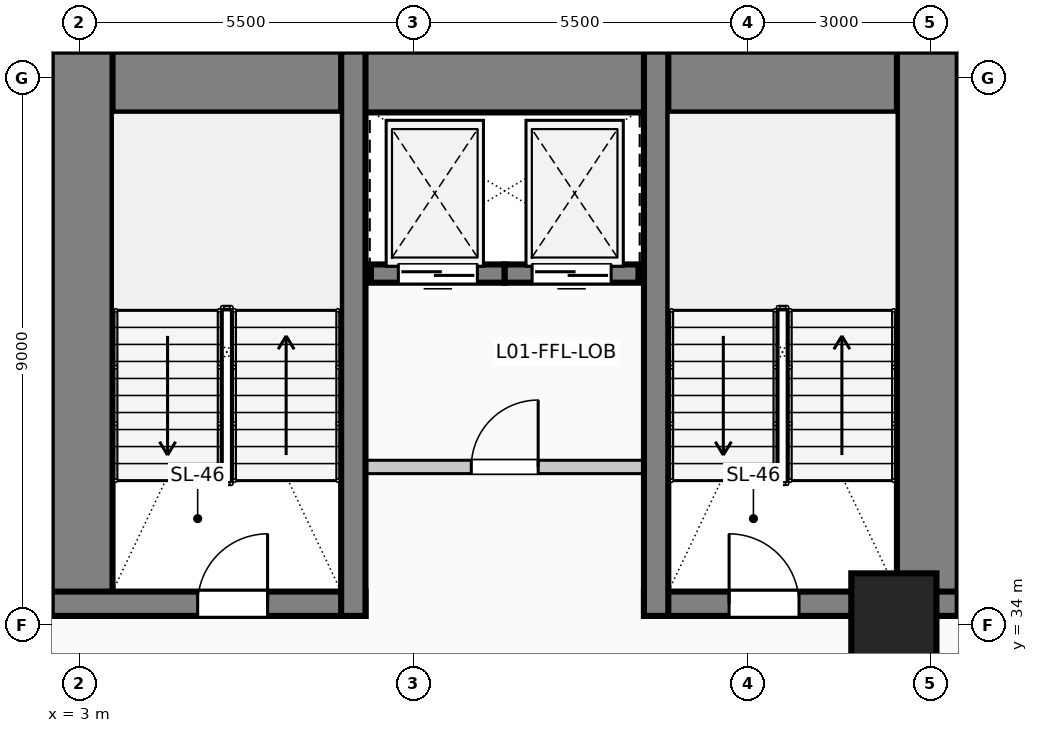
"""IFC4 building model, lengths in metres.
Left out: names, types, materials, properties, quantities, classifications, styles, units other than length and angle.
Written with IfcOpenShell. Run it as: python <this file> out.ifc"""

import sys

from ifc_helpers import new_model, si_unit, direction, frame, frame_2d, origin, origin_2d, place, context, subcontext, project, spatial, rectangle, extrude, element, fill, save


model = new_model("IFC4")
c1 = context("Model", 3, precision=1e-05, world=origin(), true_north=direction((0.0, 1.0)))
c2 = subcontext(c1, "Body", "Model", "MODEL_VIEW")
j1 = project(units=[si_unit("LENGTHUNIT", "METRE"), si_unit("PLANEANGLEUNIT", "RADIAN")], contexts=[c1])
p1 = place(None, origin())
s1 = spatial("IfcSite", under=j1, at=p1, CompositionType="ELEMENT")
p2 = place(p1, origin())
s2 = spatial("IfcBuilding", under=s1, at=p2, CompositionType="ELEMENT")
p3 = place(p2, frame((0.0, 0.0, 5.4)))
s3 = spatial("IfcBuildingStorey", under=s2, at=p3, CompositionType="ELEMENT", Elevation=5.4)
p4 = place(p3, frame((2.55, 42.93, 0.0), z_axis=(0.0, 0.0, 1.0), x_axis=(1.0, 0.0, 0.0)))
e1 = element("IfcWall", 1, at=p4, inside=s3, PredefinedType="SHEAR", context=c2, shape_type="SweptSolid", body=[
    extrude(rectangle(XDim=14.9, YDim=1.0, at=frame_2d((7.45, 0.0))), origin(), (0.0, 0.0, 1.0), 4.05),
])
for number, where, z_axis, x_axis in (
    (2, (3.05, 34.15, 0.0), (0.0, 0.0, 1.0), (0.0, 1.0, 0.0)),
    (3, (16.95, 34.15, 0.0), (0.0, 0.0, 1.0), (0.0, 1.0, 0.0)),
):
    element("IfcWall", number, at=place(p3, frame(where, z_axis=z_axis, x_axis=x_axis)), inside=s3, PredefinedType="SHEAR", context=c2, shape_type="SweptSolid", body=[
        extrude(rectangle(XDim=9.28, YDim=1.0, at=frame_2d((4.64, 0.0))), origin(), (0.0, 0.0, 1.0), 4.05),
    ])
p5 = place(p3, frame((2.55, 34.35, 0.0), z_axis=(0.0, 0.0, 1.0), x_axis=(1.0, 0.0, 0.0)))
e4 = element("IfcWall", 4, at=p5, inside=s3, PredefinedType="SHEAR", context=c2, shape_type="SweptSolid", body=[
    extrude(rectangle(XDim=5.16, YDim=0.4, at=frame_2d((2.58, 0.0))), origin(), (0.0, 0.0, 1.0), 4.05),
])
p6 = place(p5, frame((2.4, 0.0, 0.0)))
e5 = element("IfcOpeningElement", 5, at=p6, cuts=e4, PredefinedType="OPENING", context=c2, shape_type="SweptSolid", body=[
    extrude(rectangle(XDim=1.15, YDim=2.2, at=frame_2d((0.575, 1.1))), frame((0.0, 0.21, 0.0), z_axis=(0.0, -1.0, 0.0), x_axis=(1.0, 0.0, 0.0)), (0.0, 0.0, 1.0), 0.42),
])
p7 = place(p3, frame((12.29, 34.35, 0.0), z_axis=(0.0, 0.0, 1.0), x_axis=(1.0, 0.0, 0.0)))
e6 = element("IfcWall", 6, at=p7, inside=s3, PredefinedType="SHEAR", context=c2, shape_type="SweptSolid", body=[
    extrude(rectangle(XDim=5.16, YDim=0.4, at=frame_2d((2.58, 0.0))), origin(), (0.0, 0.0, 1.0), 4.05),
])
p8 = place(p7, frame((1.4, 0.0, 0.0)))
e7 = element("IfcOpeningElement", 7, at=p8, cuts=e6, PredefinedType="OPENING", context=c2, shape_type="SweptSolid", body=[
    extrude(rectangle(XDim=1.15, YDim=2.2, at=frame_2d((0.575, 1.1))), frame((0.0, 0.21, 0.0), z_axis=(0.0, -1.0, 0.0), x_axis=(1.0, 0.0, 0.0)), (0.0, 0.0, 1.0), 0.42),
])
for number, where, z_axis, x_axis in (
    (8, (7.51, 34.15, 0.0), (0.0, 0.0, 1.0), (0.0, 1.0, 0.0)),
    (9, (12.49, 34.15, 0.0), (0.0, 0.0, 1.0), (0.0, 1.0, 0.0)),
):
    element("IfcWall", number, at=place(p3, frame(where, z_axis=z_axis, x_axis=x_axis)), inside=s3, PredefinedType="SHEAR", context=c2, shape_type="SweptSolid", body=[
        extrude(rectangle(XDim=9.28, YDim=0.4, at=frame_2d((4.64, 0.0))), origin(), (0.0, 0.0, 1.0), 4.05),
    ])
p9 = place(p3, frame((16.4, 34.0, 0.0), z_axis=(0.0, 0.0, 1.0), x_axis=(1.0, 0.0, 0.0)))
e10 = element("IfcColumn", 10, at=p9, inside=s3, PredefinedType="COLUMN", context=c2, shape_type="SweptSolid", body=[
    extrude(rectangle(XDim=1.4, YDim=1.7, at=origin_2d()), origin(), (0.0, 0.0, 1.0), 4.05),
])
p10 = place(p3, frame((10.0, 39.78, 0.0), z_axis=(0.0, 0.0, 1.0), x_axis=(-1.0, 0.0, 0.0)))
e11 = element("IfcWall", 11, at=p10, inside=s3, PredefinedType="SOLIDWALL", context=c2, shape_type="SweptSolid", body=[
    extrude(rectangle(XDim=2.2, YDim=0.3, at=frame_2d((1.1, 0.0))), origin(), (0.0, 0.0, 1.0), 4.05),
])
p11 = place(p10, frame((0.45, 0.0, 0.0)))
e12 = element("IfcOpeningElement", 12, at=p11, cuts=e11, PredefinedType="OPENING", context=c2, shape_type="SweptSolid", body=[
    extrude(rectangle(XDim=1.3, YDim=2.25, at=frame_2d((0.65, 1.125))), frame((0.0, 0.16, 0.0), z_axis=(0.0, -1.0, 0.0), x_axis=(1.0, 0.0, 0.0)), (0.0, 0.0, 1.0), 0.32),
])
p12 = place(p3, frame((12.2, 39.78, 0.0), z_axis=(0.0, 0.0, 1.0), x_axis=(-1.0, 0.0, 0.0)))
e13 = element("IfcWall", 13, at=p12, inside=s3, PredefinedType="SOLIDWALL", context=c2, shape_type="SweptSolid", body=[
    extrude(rectangle(XDim=2.2, YDim=0.3, at=frame_2d((1.1, 0.0))), origin(), (0.0, 0.0, 1.0), 4.05),
])
p13 = place(p12, frame((0.45, 0.0, 0.0)))
e14 = element("IfcOpeningElement", 14, at=p13, cuts=e13, PredefinedType="OPENING", context=c2, shape_type="SweptSolid", body=[
    extrude(rectangle(XDim=1.3, YDim=2.25, at=frame_2d((0.65, 1.125))), frame((0.0, 0.16, 0.0), z_axis=(0.0, -1.0, 0.0), x_axis=(1.0, 0.0, 0.0)), (0.0, 0.0, 1.0), 0.32),
])
p14 = place(p3, frame((7.51, 36.6, 0.0), z_axis=(0.0, 0.0, 1.0), x_axis=(1.0, 0.0, 0.0)))
e15 = element("IfcWall", 15, at=p14, inside=s3, PredefinedType="PARTITIONING", context=c2, shape_type="SweptSolid", body=[
    extrude(rectangle(XDim=4.98, YDim=0.22, at=frame_2d((2.49, 0.0))), origin(), (0.0, 0.0, 1.0), 3.65),
])
p15 = place(p14, frame((1.94, 0.0, 0.0)))
e16 = element("IfcOpeningElement", 16, at=p15, cuts=e15, PredefinedType="OPENING", context=c2, shape_type="SweptSolid", body=[
    extrude(rectangle(XDim=1.1, YDim=2.2, at=frame_2d((0.55, 1.1))), frame((0.0, 0.12, 0.0), z_axis=(0.0, -1.0, 0.0), x_axis=(1.0, 0.0, 0.0)), (0.0, 0.0, 1.0), 0.24),
])
p16 = place(p11, origin())
e17 = element("IfcDoor", 17, at=p16, inside=s3, OperationType="SLIDING_TO_LEFT", PredefinedType="DOOR", context=c2, shape_type="SweptSolid", body=[
    extrude(rectangle(XDim=1.3, YDim=2.25, at=frame_2d((0.65, 1.125))), frame((0.0, 0.025, 0.0), z_axis=(0.0, -1.0, 0.0), x_axis=(1.0, 0.0, 0.0)), (0.0, 0.0, 1.0), 0.05),
])
fill(e12, e17)
p17 = place(p13, origin())
e18 = element("IfcDoor", 18, at=p17, inside=s3, OperationType="SLIDING_TO_RIGHT", PredefinedType="DOOR", context=c2, shape_type="SweptSolid", body=[
    extrude(rectangle(XDim=1.3, YDim=2.25, at=frame_2d((0.65, 1.125))), frame((0.0, 0.025, 0.0), z_axis=(0.0, -1.0, 0.0), x_axis=(1.0, 0.0, 0.0)), (0.0, 0.0, 1.0), 0.05),
])
fill(e14, e18)
p18 = place(p6, origin())
e19 = element("IfcDoor", 19, at=p18, inside=s3, OperationType="SINGLE_SWING_RIGHT", PredefinedType="DOOR", context=c2, shape_type="SweptSolid", body=[
    extrude(rectangle(XDim=1.15, YDim=2.2, at=frame_2d((0.575, 1.1))), frame((0.0, 0.025, 0.0), z_axis=(0.0, -1.0, 0.0), x_axis=(1.0, 0.0, 0.0)), (0.0, 0.0, 1.0), 0.05),
])
fill(e5, e19)
p19 = place(p8, origin())
e20 = element("IfcDoor", 20, at=p19, inside=s3, OperationType="SINGLE_SWING_LEFT", PredefinedType="DOOR", context=c2, shape_type="SweptSolid", body=[
    extrude(rectangle(XDim=1.15, YDim=2.2, at=frame_2d((0.575, 1.1))), frame((0.0, 0.025, 0.0), z_axis=(0.0, -1.0, 0.0), x_axis=(1.0, 0.0, 0.0)), (0.0, 0.0, 1.0), 0.05),
])
fill(e7, e20)
p20 = place(p15, origin())
e21 = element("IfcDoor", 21, at=p20, inside=s3, OperationType="SINGLE_SWING_RIGHT", PredefinedType="DOOR", context=c2, shape_type="SweptSolid", body=[
    extrude(rectangle(XDim=1.1, YDim=2.2, at=frame_2d((0.55, 1.1))), frame((0.0, 0.025, 0.0), z_axis=(0.0, -1.0, 0.0), x_axis=(1.0, 0.0, 0.0)), (0.0, 0.0, 1.0), 0.05),
])
fill(e16, e21)
save(model, sys.argv[1])
